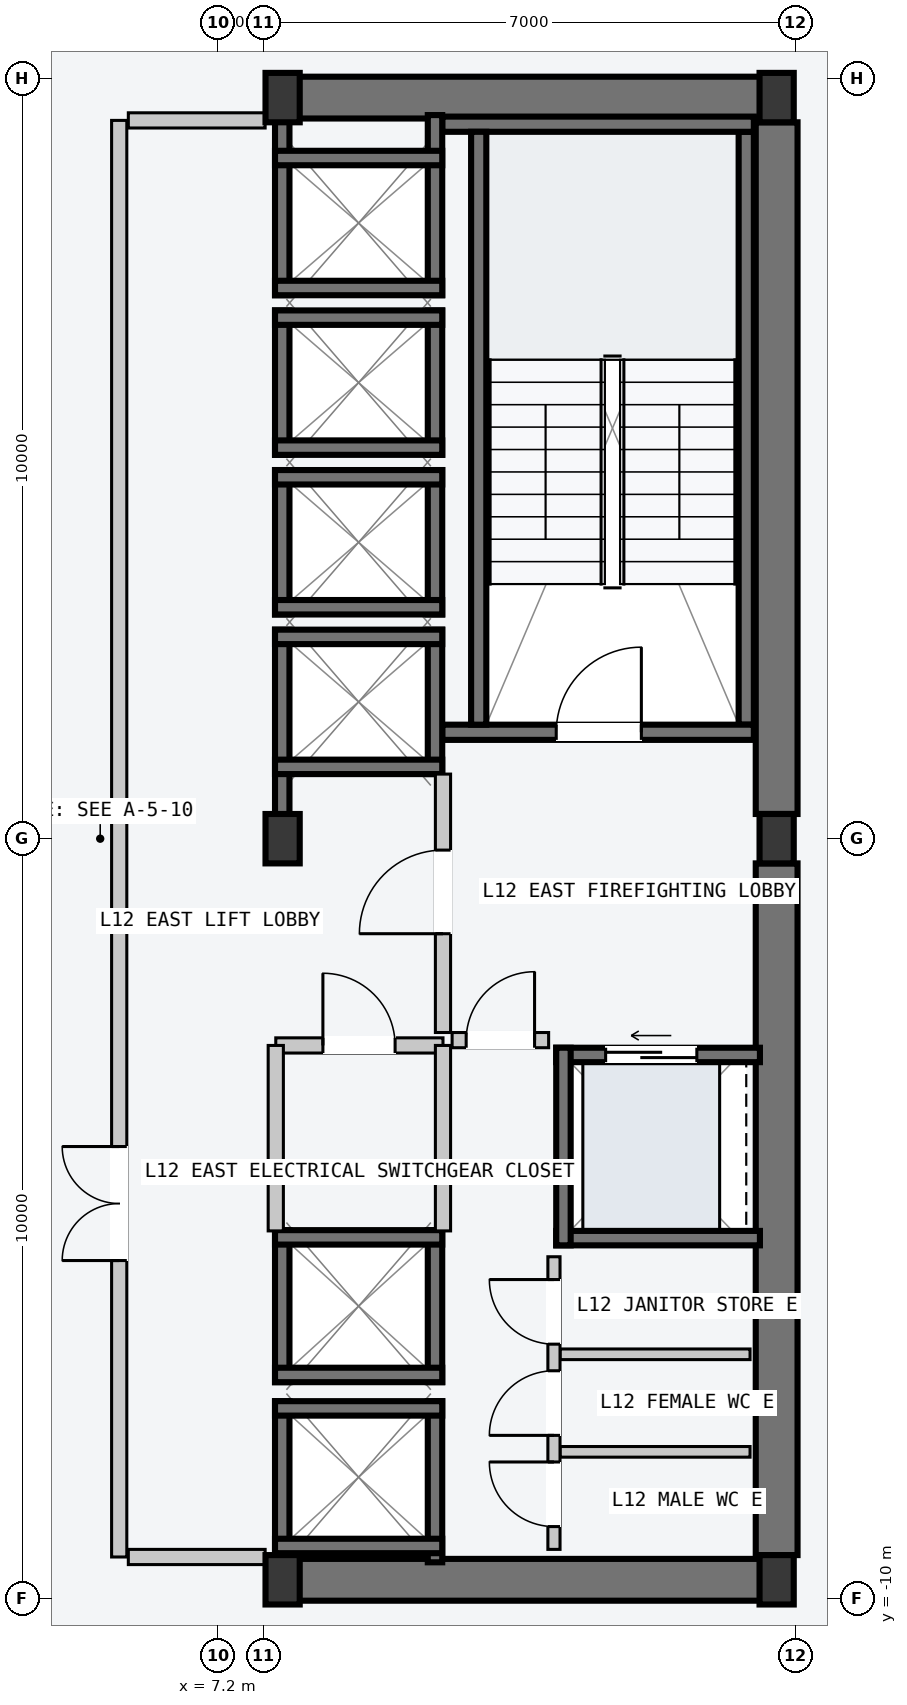
"""IFC4 building model, lengths in metres.
Left out: names, types, materials, properties, quantities, classifications, styles, units other than length and angle.
Written with IfcOpenShell. Run it as: python <this file> out.ifc"""

import sys

from ifc_helpers import new_model, si_unit, direction, frame, frame_2d, origin, origin_2d, place, context, subcontext, project, spatial, rectangle, i_section, extrude, element, fill, save


model = new_model("IFC4")
c1 = context("Model", 3, precision=1e-05, world=origin(), true_north=direction((0.0, 1.0)))
c2 = subcontext(c1, "Body", "Model", "MODEL_VIEW")
j1 = project(units=[si_unit("LENGTHUNIT", "METRE"), si_unit("PLANEANGLEUNIT", "RADIAN")], contexts=[c1])
p1 = place(None, origin())
s1 = spatial("IfcSite", under=j1, at=p1, CompositionType="ELEMENT")
p2 = place(p1, origin())
s2 = spatial("IfcBuilding", under=s1, at=p2, CompositionType="ELEMENT")
p3 = place(p2, frame((0.0, 0.0, 49.2)))
s3 = spatial("IfcBuildingStorey", under=s2, at=p3, CompositionType="ELEMENT", Elevation=49.2)
for number, where, z_axis, x_axis in (
    (1, (8.07, -9.75, -0.2), (0.0, 0.0, 1.0), (1.0, 0.0, 0.0)),
    (2, (8.07, 9.75, -0.2), (0.0, 0.0, 1.0), (1.0, 0.0, 0.0)),
):
    element("IfcWall", number, at=place(p3, frame(where, z_axis=z_axis, x_axis=x_axis)), inside=s3, PredefinedType="SHEAR", context=c2, shape_type="SweptSolid", body=[
        extrude(rectangle(XDim=6.46, YDim=0.55, at=frame_2d((3.23, 0.0))), origin(), (0.0, 0.0, 1.0), 3.6),
    ])
for number, where, z_axis, x_axis in (
    (3, (14.55, -9.425, -0.2), (0.0, 0.0, 1.0), (0.0, 1.0, 0.0)),
    (4, (14.55, 0.325, -0.2), (0.0, 0.0, 1.0), (0.0, 1.0, 0.0)),
):
    element("IfcWall", number, at=place(p3, frame(where, z_axis=z_axis, x_axis=x_axis)), inside=s3, PredefinedType="SHEAR", context=c2, shape_type="SweptSolid", body=[
        extrude(rectangle(XDim=9.1, YDim=0.55, at=frame_2d((4.55, 0.0))), origin(), (0.0, 0.0, 1.0), 3.6),
    ])
p4 = place(p3, frame((14.15, 1.5, -0.2), z_axis=(0.0, 0.0, 1.0), x_axis=(0.0, 1.0, 0.0)))
e5 = element("IfcWall", 5, at=p4, inside=s3, PredefinedType="SOLIDWALL", context=c2, shape_type="SweptSolid", body=[
    extrude(rectangle(XDim=7.8, YDim=0.2, at=frame_2d((3.9, 0.0))), origin(), (0.0, 0.0, 1.0), 3.6),
])
p5 = place(p3, frame((10.15, 1.4, -0.2), z_axis=(0.0, 0.0, 1.0), x_axis=(1.0, 0.0, 0.0)))
e6 = element("IfcWall", 6, at=p5, inside=s3, PredefinedType="SOLIDWALL", context=c2, shape_type="SweptSolid", body=[
    extrude(rectangle(XDim=4.1, YDim=0.2, at=frame_2d((2.05, 0.0))), origin(), (0.0, 0.0, 1.0), 3.6),
])
p6 = place(p5, frame((1.5, 0.0, 0.2)))
e7 = element("IfcOpeningElement", 7, at=p6, cuts=e6, PredefinedType="OPENING", context=c2, shape_type="SweptSolid", body=[
    extrude(rectangle(XDim=1.12, YDim=2.18, at=frame_2d((0.56, 1.09))), frame((0.0, 0.11, 0.0), z_axis=(0.0, -1.0, 0.0), x_axis=(1.0, 0.0, 0.0)), (0.0, 0.0, 1.0), 0.22),
])
p7 = place(p3, frame((10.15, 9.4, -0.2), z_axis=(0.0, 0.0, 1.0), x_axis=(1.0, 0.0, 0.0)))
e8 = element("IfcWall", 8, at=p7, inside=s3, PredefinedType="SOLIDWALL", context=c2, shape_type="SweptSolid", body=[
    extrude(rectangle(XDim=4.1, YDim=0.2, at=frame_2d((2.05, 0.0))), origin(), (0.0, 0.0, 1.0), 3.6),
])
p8 = place(p3, frame((10.63, 1.5, -0.2), z_axis=(0.0, 0.0, 1.0), x_axis=(0.0, 1.0, 0.0)))
e9 = element("IfcWall", 9, at=p8, inside=s3, PredefinedType="SOLIDWALL", context=c2, shape_type="SweptSolid", body=[
    extrude(rectangle(XDim=7.8, YDim=0.2, at=frame_2d((3.9, 0.0))), origin(), (0.0, 0.0, 1.0), 3.6),
])
for number, where, z_axis, x_axis in (
    (10, (8.05, -9.75, 0.0), (0.0, 0.0, 1.0), (1.0, 0.0, 0.0)),
    (11, (8.05, 0.0, 0.0), (0.0, 0.0, 1.0), (1.0, 0.0, 0.0)),
    (12, (8.05, 9.75, 0.0), (0.0, 0.0, 1.0), (1.0, 0.0, 0.0)),
    (13, (14.55, -9.75, 0.0), (0.0, 0.0, 1.0), (1.0, 0.0, 0.0)),
    (14, (14.55, 0.0, 0.0), (0.0, 0.0, 1.0), (1.0, 0.0, 0.0)),
    (15, (14.55, 9.75, 0.0), (0.0, 0.0, 1.0), (1.0, 0.0, 0.0)),
):
    element("IfcColumn", number, at=place(p3, frame(where, z_axis=z_axis, x_axis=x_axis)), inside=s3, PredefinedType="COLUMN", context=c2, shape_type="SweptSolid", body=[
        extrude(i_section(OverallWidth=0.45, OverallDepth=0.65, WebThickness=0.025, FlangeThickness=0.04, at=origin_2d()), origin(), (0.0, 0.0, 1.0), 3.6),
    ])
p9 = place(p3, frame((8.045, 0.21, -0.2), z_axis=(0.0, 0.0, 1.0), x_axis=(0.0, 1.0, 0.0)))
e16 = element("IfcWall", 16, at=p9, inside=s3, PredefinedType="SOLIDWALL", context=c2, shape_type="SweptSolid", body=[
    extrude(rectangle(XDim=2.54, YDim=0.19, at=frame_2d((1.27, 0.0))), origin(), (0.0, 0.0, 1.0), 3.6),
])
p10 = place(p3, frame((10.055, 0.85, -0.2), z_axis=(0.0, 0.0, 1.0), x_axis=(0.0, 1.0, 0.0)))
e17 = element("IfcWall", 17, at=p10, inside=s3, PredefinedType="SOLIDWALL", context=c2, shape_type="SweptSolid", body=[
    extrude(rectangle(XDim=1.9, YDim=0.19, at=frame_2d((0.95, 0.0))), origin(), (0.0, 0.0, 1.0), 3.6),
])
for number, where, z_axis, x_axis in (
    (18, (7.95, 2.655, -0.2), (0.0, 0.0, 1.0), (1.0, 0.0, 0.0)),
    (19, (7.95, 0.945, -0.2), (0.0, 0.0, 1.0), (1.0, 0.0, 0.0)),
):
    element("IfcWall", number, at=place(p3, frame(where, z_axis=z_axis, x_axis=x_axis)), inside=s3, PredefinedType="SOLIDWALL", context=c2, shape_type="SweptSolid", body=[
        extrude(rectangle(XDim=2.2, YDim=0.19, at=frame_2d((1.1, 0.0))), origin(), (0.0, 0.0, 1.0), 3.6),
    ])
for number, where, z_axis, x_axis in (
    (20, (8.045, 2.95, -0.2), (0.0, 0.0, 1.0), (0.0, 1.0, 0.0)),
    (21, (10.055, 2.95, -0.2), (0.0, 0.0, 1.0), (0.0, 1.0, 0.0)),
):
    element("IfcWall", number, at=place(p3, frame(where, z_axis=z_axis, x_axis=x_axis)), inside=s3, PredefinedType="SOLIDWALL", context=c2, shape_type="SweptSolid", body=[
        extrude(rectangle(XDim=1.9, YDim=0.19, at=frame_2d((0.95, 0.0))), origin(), (0.0, 0.0, 1.0), 3.6),
    ])
for number, where, z_axis, x_axis in (
    (22, (7.95, 4.755, -0.2), (0.0, 0.0, 1.0), (1.0, 0.0, 0.0)),
    (23, (7.95, 3.045, -0.2), (0.0, 0.0, 1.0), (1.0, 0.0, 0.0)),
):
    element("IfcWall", number, at=place(p3, frame(where, z_axis=z_axis, x_axis=x_axis)), inside=s3, PredefinedType="SOLIDWALL", context=c2, shape_type="SweptSolid", body=[
        extrude(rectangle(XDim=2.2, YDim=0.19, at=frame_2d((1.1, 0.0))), origin(), (0.0, 0.0, 1.0), 3.6),
    ])
for number, where, z_axis, x_axis in (
    (24, (8.045, 5.05, -0.2), (0.0, 0.0, 1.0), (0.0, 1.0, 0.0)),
    (25, (10.055, 5.05, -0.2), (0.0, 0.0, 1.0), (0.0, 1.0, 0.0)),
):
    element("IfcWall", number, at=place(p3, frame(where, z_axis=z_axis, x_axis=x_axis)), inside=s3, PredefinedType="SOLIDWALL", context=c2, shape_type="SweptSolid", body=[
        extrude(rectangle(XDim=1.9, YDim=0.19, at=frame_2d((0.95, 0.0))), origin(), (0.0, 0.0, 1.0), 3.6),
    ])
for number, where, z_axis, x_axis in (
    (26, (7.95, 6.855, -0.2), (0.0, 0.0, 1.0), (1.0, 0.0, 0.0)),
    (27, (7.95, 5.145, -0.2), (0.0, 0.0, 1.0), (1.0, 0.0, 0.0)),
):
    element("IfcWall", number, at=place(p3, frame(where, z_axis=z_axis, x_axis=x_axis)), inside=s3, PredefinedType="SOLIDWALL", context=c2, shape_type="SweptSolid", body=[
        extrude(rectangle(XDim=2.2, YDim=0.19, at=frame_2d((1.1, 0.0))), origin(), (0.0, 0.0, 1.0), 3.6),
    ])
for number, where, z_axis, x_axis in (
    (28, (8.045, 7.15, -0.2), (0.0, 0.0, 1.0), (0.0, 1.0, 0.0)),
    (29, (10.055, 7.15, -0.2), (0.0, 0.0, 1.0), (0.0, 1.0, 0.0)),
):
    element("IfcWall", number, at=place(p3, frame(where, z_axis=z_axis, x_axis=x_axis)), inside=s3, PredefinedType="SOLIDWALL", context=c2, shape_type="SweptSolid", body=[
        extrude(rectangle(XDim=2.37, YDim=0.19, at=frame_2d((1.185, 0.0))), origin(), (0.0, 0.0, 1.0), 3.6),
    ])
for number, where, z_axis, x_axis in (
    (30, (7.95, 8.955, -0.2), (0.0, 0.0, 1.0), (1.0, 0.0, 0.0)),
    (31, (7.95, 7.245, -0.2), (0.0, 0.0, 1.0), (1.0, 0.0, 0.0)),
):
    element("IfcWall", number, at=place(p3, frame(where, z_axis=z_axis, x_axis=x_axis)), inside=s3, PredefinedType="SOLIDWALL", context=c2, shape_type="SweptSolid", body=[
        extrude(rectangle(XDim=2.2, YDim=0.19, at=frame_2d((1.1, 0.0))), origin(), (0.0, 0.0, 1.0), 3.6),
    ])
for number, where, z_axis, x_axis in (
    (32, (8.045, -9.52, -0.2), (0.0, 0.0, 1.0), (0.0, 1.0, 0.0)),
    (33, (10.055, -9.52, -0.2), (0.0, 0.0, 1.0), (0.0, 1.0, 0.0)),
):
    element("IfcWall", number, at=place(p3, frame(where, z_axis=z_axis, x_axis=x_axis)), inside=s3, PredefinedType="SOLIDWALL", context=c2, shape_type="SweptSolid", body=[
        extrude(rectangle(XDim=2.12, YDim=0.19, at=frame_2d((1.06, 0.0))), origin(), (0.0, 0.0, 1.0), 3.6),
    ])
for number, where, z_axis, x_axis in (
    (34, (7.95, -7.495, -0.2), (0.0, 0.0, 1.0), (1.0, 0.0, 0.0)),
    (35, (7.95, -9.305, -0.2), (0.0, 0.0, 1.0), (1.0, 0.0, 0.0)),
):
    element("IfcWall", number, at=place(p3, frame(where, z_axis=z_axis, x_axis=x_axis)), inside=s3, PredefinedType="SOLIDWALL", context=c2, shape_type="SweptSolid", body=[
        extrude(rectangle(XDim=2.2, YDim=0.19, at=frame_2d((1.1, 0.0))), origin(), (0.0, 0.0, 1.0), 3.6),
    ])
for number, where, z_axis, x_axis in (
    (36, (8.045, -7.15, -0.2), (0.0, 0.0, 1.0), (0.0, 1.0, 0.0)),
    (37, (10.055, -7.15, -0.2), (0.0, 0.0, 1.0), (0.0, 1.0, 0.0)),
):
    element("IfcWall", number, at=place(p3, frame(where, z_axis=z_axis, x_axis=x_axis)), inside=s3, PredefinedType="SOLIDWALL", context=c2, shape_type="SweptSolid", body=[
        extrude(rectangle(XDim=2.0, YDim=0.19, at=frame_2d((1.0, 0.0))), origin(), (0.0, 0.0, 1.0), 3.6),
    ])
for number, where, z_axis, x_axis in (
    (38, (7.95, -5.245, -0.2), (0.0, 0.0, 1.0), (1.0, 0.0, 0.0)),
    (39, (7.95, -7.055, -0.2), (0.0, 0.0, 1.0), (1.0, 0.0, 0.0)),
):
    element("IfcWall", number, at=place(p3, frame(where, z_axis=z_axis, x_axis=x_axis)), inside=s3, PredefinedType="SOLIDWALL", context=c2, shape_type="SweptSolid", body=[
        extrude(rectangle(XDim=2.2, YDim=0.19, at=frame_2d((1.1, 0.0))), origin(), (0.0, 0.0, 1.0), 3.6),
    ])
p11 = place(p3, frame((11.65, -2.845, -0.2), z_axis=(0.0, 0.0, 1.0), x_axis=(1.0, 0.0, 0.0)))
e40 = element("IfcWall", 40, at=p11, inside=s3, PredefinedType="SOLIDWALL", context=c2, shape_type="SweptSolid", body=[
    extrude(rectangle(XDim=2.68, YDim=0.19, at=frame_2d((1.34, 0.0))), origin(), (0.0, 0.0, 1.0), 3.6),
])
p12 = place(p11, frame((0.65, 0.0, 0.2)))
e41 = element("IfcOpeningElement", 41, at=p12, cuts=e40, PredefinedType="OPENING", context=c2, shape_type="SweptSolid", body=[
    extrude(rectangle(XDim=1.2, YDim=2.2, at=frame_2d((0.6, 1.1))), frame((0.0, 0.105, 0.0), z_axis=(0.0, -1.0, 0.0), x_axis=(1.0, 0.0, 0.0)), (0.0, 0.0, 1.0), 0.21),
])
p13 = place(p3, frame((11.65, -5.255, -0.2), z_axis=(0.0, 0.0, 1.0), x_axis=(1.0, 0.0, 0.0)))
e42 = element("IfcWall", 42, at=p13, inside=s3, PredefinedType="SOLIDWALL", context=c2, shape_type="SweptSolid", body=[
    extrude(rectangle(XDim=2.68, YDim=0.19, at=frame_2d((1.34, 0.0))), origin(), (0.0, 0.0, 1.0), 3.6),
])
p14 = place(p3, frame((11.745, -5.35, -0.2), z_axis=(0.0, 0.0, 1.0), x_axis=(0.0, 1.0, 0.0)))
e43 = element("IfcWall", 43, at=p14, inside=s3, PredefinedType="SOLIDWALL", context=c2, shape_type="SweptSolid", body=[
    extrude(rectangle(XDim=2.6, YDim=0.19, at=frame_2d((1.3, 0.0))), origin(), (0.0, 0.0, 1.0), 3.6),
])
p15 = place(p3, frame((5.9, -9.45, 0.0), z_axis=(0.0, 0.0, 1.0), x_axis=(0.0, 1.0, 0.0)))
e44 = element("IfcWall", 44, at=p15, inside=s3, PredefinedType="PARTITIONING", context=c2, shape_type="SweptSolid", body=[
    extrude(rectangle(XDim=18.9, YDim=0.2, at=frame_2d((9.45, 0.0))), origin(), (0.0, 0.0, 1.0), 3.4),
])
p16 = place(p15, frame((3.9, 0.0, 0.0)))
e45 = element("IfcOpeningElement", 45, at=p16, cuts=e44, PredefinedType="OPENING", context=c2, shape_type="SweptSolid", body=[
    extrude(rectangle(XDim=1.5, YDim=2.2, at=frame_2d((0.75, 1.1))), frame((0.0, 0.11, 0.0), z_axis=(0.0, -1.0, 0.0), x_axis=(1.0, 0.0, 0.0)), (0.0, 0.0, 1.0), 0.22),
])
for number, where, z_axis, x_axis in (
    (46, (6.02, -9.45, 0.0), (0.0, 0.0, 1.0), (1.0, 0.0, 0.0)),
    (47, (6.02, 9.45, 0.0), (0.0, 0.0, 1.0), (1.0, 0.0, 0.0)),
):
    element("IfcWall", number, at=place(p3, frame(where, z_axis=z_axis, x_axis=x_axis)), inside=s3, PredefinedType="PARTITIONING", context=c2, shape_type="SweptSolid", body=[
        extrude(rectangle(XDim=1.8, YDim=0.2, at=frame_2d((0.9, 0.0))), origin(), (0.0, 0.0, 1.0), 3.4),
    ])
p17 = place(p3, frame((10.16, -2.55, 0.0), z_axis=(0.0, 0.0, 1.0), x_axis=(0.0, 1.0, 0.0)))
e48 = element("IfcWall", 48, at=p17, inside=s3, PredefinedType="PARTITIONING", context=c2, shape_type="SweptSolid", body=[
    extrude(rectangle(XDim=3.4, YDim=0.2, at=frame_2d((1.7, 0.0))), origin(), (0.0, 0.0, 1.0), 3.4),
])
p18 = place(p17, frame((1.3, 0.0, 0.0)))
e49 = element("IfcOpeningElement", 49, at=p18, cuts=e48, PredefinedType="OPENING", context=c2, shape_type="SweptSolid", body=[
    extrude(rectangle(XDim=1.1, YDim=2.15, at=frame_2d((0.55, 1.075))), frame((0.0, 0.11, 0.0), z_axis=(0.0, -1.0, 0.0), x_axis=(1.0, 0.0, 0.0)), (0.0, 0.0, 1.0), 0.22),
])
p19 = place(p3, frame((10.28, -2.65, 0.0), z_axis=(0.0, 0.0, 1.0), x_axis=(1.0, 0.0, 0.0)))
e50 = element("IfcWall", 50, at=p19, inside=s3, PredefinedType="PARTITIONING", context=c2, shape_type="SweptSolid", body=[
    extrude(rectangle(XDim=1.27, YDim=0.2, at=frame_2d((0.635, 0.0))), origin(), (0.0, 0.0, 1.0), 3.4),
])
p20 = place(p19, frame((0.185, 0.0, 0.0)))
e51 = element("IfcOpeningElement", 51, at=p20, cuts=e50, PredefinedType="OPENING", context=c2, shape_type="SweptSolid", body=[
    extrude(rectangle(XDim=0.9, YDim=2.15, at=frame_2d((0.45, 1.075))), frame((0.0, 0.11, 0.0), z_axis=(0.0, -1.0, 0.0), x_axis=(1.0, 0.0, 0.0)), (0.0, 0.0, 1.0), 0.22),
])
p21 = place(p3, frame((7.96, -2.72, 0.0), z_axis=(0.0, 0.0, 1.0), x_axis=(1.0, 0.0, 0.0)))
e52 = element("IfcWall", 52, at=p21, inside=s3, PredefinedType="PARTITIONING", context=c2, shape_type="SweptSolid", body=[
    extrude(rectangle(XDim=2.2, YDim=0.2, at=frame_2d((1.1, 0.0))), origin(), (0.0, 0.0, 1.0), 3.4),
])
p22 = place(p21, frame((0.62, 0.0, 0.0)))
e53 = element("IfcOpeningElement", 53, at=p22, cuts=e52, PredefinedType="OPENING", context=c2, shape_type="SweptSolid", body=[
    extrude(rectangle(XDim=0.95, YDim=2.1, at=frame_2d((0.475, 1.05))), frame((0.0, 0.11, 0.0), z_axis=(0.0, -1.0, 0.0), x_axis=(1.0, 0.0, 0.0)), (0.0, 0.0, 1.0), 0.22),
])
for number, where, z_axis, x_axis in (
    (54, (7.96, -5.16, 0.0), (0.0, 0.0, 1.0), (0.0, 1.0, 0.0)),
    (55, (10.16, -5.16, 0.0), (0.0, 0.0, 1.0), (0.0, 1.0, 0.0)),
):
    element("IfcWall", number, at=place(p3, frame(where, z_axis=z_axis, x_axis=x_axis)), inside=s3, PredefinedType="PARTITIONING", context=c2, shape_type="SweptSolid", body=[
        extrude(rectangle(XDim=2.44, YDim=0.2, at=frame_2d((1.22, 0.0))), origin(), (0.0, 0.0, 1.0), 3.4),
    ])
for number, where, z_axis, x_axis in (
    (56, (11.7, -8.067, 0.0), (0.0, 0.0, 1.0), (1.0, 0.0, 0.0)),
    (57, (11.7, -6.783, 0.0), (0.0, 0.0, 1.0), (1.0, 0.0, 0.0)),
):
    element("IfcWall", number, at=place(p3, frame(where, z_axis=z_axis, x_axis=x_axis)), inside=s3, PredefinedType="PARTITIONING", context=c2, shape_type="SweptSolid", body=[
        extrude(rectangle(XDim=2.5, YDim=0.14, at=frame_2d((1.25, 0.0))), origin(), (0.0, 0.0, 1.0), 3.4),
    ])
p23 = place(p3, frame((11.62, -9.35, 0.0), z_axis=(0.0, 0.0, 1.0), x_axis=(0.0, 1.0, 0.0)))
e58 = element("IfcWall", 58, at=p23, inside=s3, PredefinedType="PARTITIONING", context=c2, shape_type="SweptSolid", body=[
    extrude(rectangle(XDim=3.85, YDim=0.16, at=frame_2d((1.925, 0.0))), origin(), (0.0, 0.0, 1.0), 3.4),
])
p24 = place(p23, frame((0.3, 0.0, 0.0)))
e59 = element("IfcOpeningElement", 59, at=p24, cuts=e58, PredefinedType="OPENING", context=c2, shape_type="SweptSolid", body=[
    extrude(rectangle(XDim=0.85, YDim=2.12, at=frame_2d((0.425, 1.06))), frame((0.0, 0.09, 0.0), z_axis=(0.0, -1.0, 0.0), x_axis=(1.0, 0.0, 0.0)), (0.0, 0.0, 1.0), 0.18),
])
p25 = place(p23, frame((1.5, 0.0, 0.0)))
e60 = element("IfcOpeningElement", 60, at=p25, cuts=e58, PredefinedType="OPENING", context=c2, shape_type="SweptSolid", body=[
    extrude(rectangle(XDim=0.85, YDim=2.12, at=frame_2d((0.425, 1.06))), frame((0.0, 0.09, 0.0), z_axis=(0.0, -1.0, 0.0), x_axis=(1.0, 0.0, 0.0)), (0.0, 0.0, 1.0), 0.18),
])
p26 = place(p23, frame((2.7, 0.0, 0.0)))
e61 = element("IfcOpeningElement", 61, at=p26, cuts=e58, PredefinedType="OPENING", context=c2, shape_type="SweptSolid", body=[
    extrude(rectangle(XDim=0.85, YDim=2.12, at=frame_2d((0.425, 1.06))), frame((0.0, 0.09, 0.0), z_axis=(0.0, -1.0, 0.0), x_axis=(1.0, 0.0, 0.0)), (0.0, 0.0, 1.0), 0.18),
])
p27 = place(p6, origin())
e62 = element("IfcDoor", 62, at=p27, inside=s3, OperationType="SINGLE_SWING_RIGHT", PredefinedType="DOOR", context=c2, shape_type="SweptSolid", body=[
    extrude(rectangle(XDim=1.12, YDim=2.18, at=frame_2d((0.56, 1.09))), frame((0.0, 0.025, 0.0), z_axis=(0.0, -1.0, 0.0), x_axis=(1.0, 0.0, 0.0)), (0.0, 0.0, 1.0), 0.05),
])
fill(e7, e62)
p28 = place(p12, origin())
e63 = element("IfcDoor", 63, at=p28, inside=s3, OperationType="SLIDING_TO_LEFT", PredefinedType="DOOR", context=c2, shape_type="SweptSolid", body=[
    extrude(rectangle(XDim=1.2, YDim=2.2, at=frame_2d((0.6, 1.1))), frame((0.0, 0.025, 0.0), z_axis=(0.0, -1.0, 0.0), x_axis=(1.0, 0.0, 0.0)), (0.0, 0.0, 1.0), 0.05),
])
fill(e41, e63)
p29 = place(p16, origin())
e64 = element("IfcDoor", 64, at=p29, inside=s3, OperationType="DOUBLE_DOOR_SINGLE_SWING", PredefinedType="DOOR", context=c2, shape_type="SweptSolid", body=[
    extrude(rectangle(XDim=1.5, YDim=2.2, at=frame_2d((0.75, 1.1))), frame((0.0, 0.025, 0.0), z_axis=(0.0, -1.0, 0.0), x_axis=(1.0, 0.0, 0.0)), (0.0, 0.0, 1.0), 0.05),
])
fill(e45, e64)
p30 = place(p18, origin())
e65 = element("IfcDoor", 65, at=p30, inside=s3, OperationType="SINGLE_SWING_LEFT", PredefinedType="DOOR", context=c2, shape_type="SweptSolid", body=[
    extrude(rectangle(XDim=1.1, YDim=2.15, at=frame_2d((0.55, 1.075))), frame((0.0, 0.025, 0.0), z_axis=(0.0, -1.0, 0.0), x_axis=(1.0, 0.0, 0.0)), (0.0, 0.0, 1.0), 0.05),
])
fill(e49, e65)
p31 = place(p20, origin())
e66 = element("IfcDoor", 66, at=p31, inside=s3, OperationType="SINGLE_SWING_RIGHT", PredefinedType="DOOR", context=c2, shape_type="SweptSolid", body=[
    extrude(rectangle(XDim=0.9, YDim=2.15, at=frame_2d((0.45, 1.075))), frame((0.0, 0.025, 0.0), z_axis=(0.0, -1.0, 0.0), x_axis=(1.0, 0.0, 0.0)), (0.0, 0.0, 1.0), 0.05),
])
fill(e51, e66)
p32 = place(p22, origin())
e67 = element("IfcDoor", 67, at=p32, inside=s3, OperationType="SINGLE_SWING_LEFT", PredefinedType="DOOR", context=c2, shape_type="SweptSolid", body=[
    extrude(rectangle(XDim=0.95, YDim=2.1, at=frame_2d((0.475, 1.05))), frame((0.0, 0.025, 0.0), z_axis=(0.0, -1.0, 0.0), x_axis=(1.0, 0.0, 0.0)), (0.0, 0.0, 1.0), 0.05),
])
fill(e53, e67)
p33 = place(p24, origin())
e68 = element("IfcDoor", 68, at=p33, inside=s3, OperationType="SINGLE_SWING_RIGHT", PredefinedType="DOOR", context=c2, shape_type="SweptSolid", body=[
    extrude(rectangle(XDim=0.85, YDim=2.12, at=frame_2d((0.425, 1.06))), frame((0.0, 0.025, 0.0), z_axis=(0.0, -1.0, 0.0), x_axis=(1.0, 0.0, 0.0)), (0.0, 0.0, 1.0), 0.05),
])
fill(e59, e68)
p34 = place(p25, origin())
e69 = element("IfcDoor", 69, at=p34, inside=s3, OperationType="SINGLE_SWING_LEFT", PredefinedType="DOOR", context=c2, shape_type="SweptSolid", body=[
    extrude(rectangle(XDim=0.85, YDim=2.12, at=frame_2d((0.425, 1.06))), frame((0.0, 0.025, 0.0), z_axis=(0.0, -1.0, 0.0), x_axis=(1.0, 0.0, 0.0)), (0.0, 0.0, 1.0), 0.05),
])
fill(e60, e69)
p35 = place(p26, origin())
e70 = element("IfcDoor", 70, at=p35, inside=s3, OperationType="SINGLE_SWING_RIGHT", PredefinedType="DOOR", context=c2, shape_type="SweptSolid", body=[
    extrude(rectangle(XDim=0.85, YDim=2.12, at=frame_2d((0.425, 1.06))), frame((0.0, 0.025, 0.0), z_axis=(0.0, -1.0, 0.0), x_axis=(1.0, 0.0, 0.0)), (0.0, 0.0, 1.0), 0.05),
])
fill(e61, e70)
save(model, sys.argv[1])
